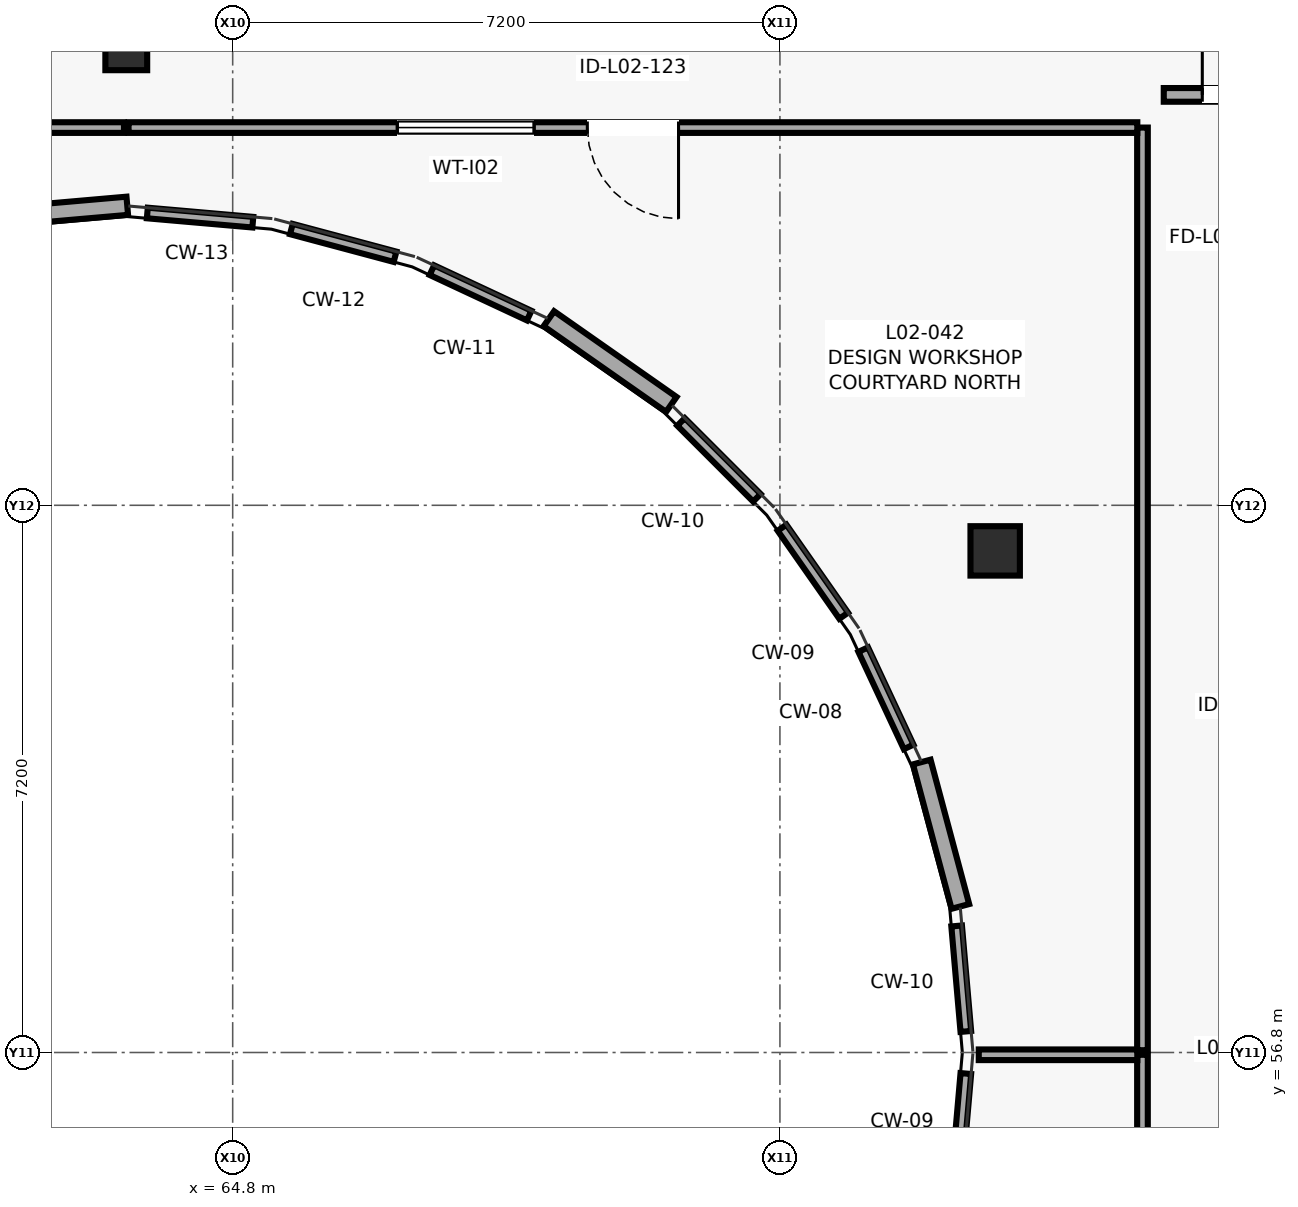
"""IFC4 building model, lengths in metres.
Left out: names, types, materials, properties, quantities, classifications, styles, units other than length and angle.
Written with IfcOpenShell. Run it as: python <this file> out.ifc"""

import sys

from ifc_helpers import new_model, si_unit, direction, frame, frame_2d, origin, origin_2d, place, context, subcontext, project, spatial, rectangle, circle, extrude, element, fill, save


model = new_model("IFC4")
c1 = context("Model", 3, precision=1e-05, world=origin(), true_north=direction((0.0, 1.0)))
c2 = subcontext(c1, "Body", "Model", "MODEL_VIEW")
j1 = project(units=[si_unit("LENGTHUNIT", "METRE"), si_unit("PLANEANGLEUNIT", "RADIAN")], contexts=[c1])
p1 = place(None, origin())
s1 = spatial("IfcSite", under=j1, at=p1, CompositionType="ELEMENT")
p2 = place(p1, origin())
s2 = spatial("IfcBuilding", under=s1, at=p2, CompositionType="ELEMENT")
p3 = place(p2, frame((0.0, 0.0, 8.2)))
s3 = spatial("IfcBuildingStorey", under=s2, at=p3, CompositionType="ELEMENT", Elevation=8.2)
p4 = place(p3, frame((63.4, 70.0, 0.0), z_axis=(0.0, 0.0, 1.0), x_axis=(1.0, 0.0, 0.0)))
e1 = element("IfcColumn", 1, at=p4, inside=s3, PredefinedType="COLUMN", context=c2, shape_type="SweptSolid", body=[
    extrude(circle(Radius=0.275, at=origin_2d()), origin(), (0.0, 0.0, 1.0), 4.0),
])
p5 = place(p3, frame((74.832, 63.4, 0.0), z_axis=(0.0, 0.0, 1.0), x_axis=(1.0, 0.0, 0.0)))
e2 = element("IfcColumn", 2, at=p5, inside=s3, PredefinedType="COLUMN", context=c2, shape_type="SweptSolid", body=[
    extrude(circle(Radius=0.325, at=origin_2d()), origin(), (0.0, 0.0, 1.0), 4.0),
])
p6 = place(p3, frame((70.571, 65.327, 0.0), z_axis=(0.0, 0.0, 1.0), x_axis=(-0.819132771028, 0.573603960436, 0.0)))
e3 = element("IfcWall", 3, at=p6, inside=s3, PredefinedType="SOLIDWALL", context=c2, shape_type="SweptSolid", body=[
    extrude(rectangle(XDim=1.967, YDim=0.24, at=frame_2d((0.983, 0.0))), origin(), (0.0, 0.0, 1.0), 3.78),
])
p7 = place(p3, frame((63.413, 67.941, 0.0), z_axis=(0.0, 0.0, 1.0), x_axis=(-0.996221008334, -0.0868544907, 0.0)))
e4 = element("IfcWall", 4, at=p7, inside=s3, PredefinedType="SOLIDWALL", context=c2, shape_type="SweptSolid", body=[
    extrude(rectangle(XDim=1.968, YDim=0.24, at=frame_2d((0.984, 0.0))), origin(), (0.0, 0.0, 1.0), 3.78),
])
p8 = place(p3, frame((74.374, 58.722, 0.0), z_axis=(0.0, 0.0, 1.0), x_axis=(-0.258303819724, 0.966063733258, 0.0)))
e5 = element("IfcWall", 5, at=p8, inside=s3, PredefinedType="SOLIDWALL", context=c2, shape_type="SweptSolid", body=[
    extrude(rectangle(XDim=1.967, YDim=0.24, at=frame_2d((0.983, 0.0))), origin(), (0.0, 0.0, 1.0), 3.78),
])
p9 = place(p3, frame((77.05, 69.4, 0.0), z_axis=(0.0, 0.0, 1.0), x_axis=(1.0, 0.0, 0.0)))
e6 = element("IfcWall", 6, at=p9, inside=s3, PredefinedType="PARTITIONING", context=c2, shape_type="SweptSolid", body=[
    extrude(rectangle(XDim=2.5, YDim=0.18, at=frame_2d((1.25, 0.0))), origin(), (0.0, 0.0, 1.0), 3.78),
])
p10 = place(p9, frame((0.507, 0.0, 0.0)))
e7 = element("IfcOpeningElement", 7, at=p10, cuts=e6, PredefinedType="OPENING", context=c2, shape_type="SweptSolid", body=[
    extrude(rectangle(XDim=1.05, YDim=2.15, at=frame_2d((0.525, 1.075))), frame((0.0, 0.1, 0.0), z_axis=(0.0, -1.0, 0.0), x_axis=(1.0, 0.0, 0.0)), (0.0, 0.0, 1.0), 0.2),
])
p11 = place(p3, frame((63.37, 68.97, 0.0), z_axis=(0.0, 0.0, 1.0), x_axis=(-1.0, 0.0, 0.0)))
e8 = element("IfcWall", 8, at=p11, inside=s3, PredefinedType="PARTITIONING", context=c2, shape_type="SweptSolid", body=[
    extrude(rectangle(XDim=17.54, YDim=0.14, at=frame_2d((8.77, 0.0))), origin(), (0.0, 0.0, 1.0), 3.775),
])
p12 = place(p11, frame((8.245, 0.0, 0.0)))
e9 = element("IfcOpeningElement", 9, at=p12, cuts=e8, PredefinedType="OPENING", context=c2, shape_type="SweptSolid", body=[
    extrude(rectangle(XDim=1.05, YDim=2.1, at=frame_2d((0.525, 1.05))), frame((0.0, 0.08, 0.0), z_axis=(0.0, -1.0, 0.0), x_axis=(1.0, 0.0, 0.0)), (0.0, 0.0, 1.0), 0.16),
])
p13 = place(p11, frame((9.995, 0.0, 1.05)))
e10 = element("IfcOpeningElement", 10, at=p13, cuts=e8, PredefinedType="OPENING", context=c2, shape_type="SweptSolid", body=[
    extrude(rectangle(XDim=1.4, YDim=1.05, at=frame_2d((0.7, 0.525))), frame((0.0, 0.08, 0.0), z_axis=(0.0, -1.0, 0.0), x_axis=(1.0, 0.0, 0.0)), (0.0, 0.0, 1.0), 0.16),
])
p14 = place(p3, frame((76.77, 44.698, 0.0), z_axis=(0.0, 0.0, 1.0), x_axis=(0.0, 1.0, 0.0)))
e11 = element("IfcWall", 11, at=p14, inside=s3, PredefinedType="PARTITIONING", context=c2, shape_type="SweptSolid", body=[
    extrude(rectangle(XDim=12.072, YDim=0.14, at=frame_2d((6.036, 0.0))), origin(), (0.0, 0.0, 1.0), 3.775),
])
p15 = place(p14, frame((5.546, 0.0, 0.0)))
e12 = element("IfcOpeningElement", 12, at=p15, cuts=e11, PredefinedType="OPENING", context=c2, shape_type="SweptSolid", body=[
    extrude(rectangle(XDim=0.98, YDim=2.12, at=frame_2d((0.49, 1.06))), frame((0.0, 0.08, 0.0), z_axis=(0.0, -1.0, 0.0), x_axis=(1.0, 0.0, 0.0)), (0.0, 0.0, 1.0), 0.16),
])
p16 = place(p14, frame((7.226, 0.0, 1.05)))
e13 = element("IfcOpeningElement", 13, at=p16, cuts=e11, PredefinedType="OPENING", context=c2, shape_type="SweptSolid", body=[
    extrude(rectangle(XDim=1.6, YDim=1.1, at=frame_2d((0.8, 0.55))), frame((0.0, 0.08, 0.0), z_axis=(0.0, -1.0, 0.0), x_axis=(1.0, 0.0, 0.0)), (0.0, 0.0, 1.0), 0.16),
])
p17 = place(p3, frame((76.702, 56.77, 0.0), z_axis=(0.0, 0.0, 1.0), x_axis=(-1.0, 0.0, 0.0)))
e14 = element("IfcWall", 14, at=p17, inside=s3, PredefinedType="PARTITIONING", context=c2, shape_type="SweptSolid", body=[
    extrude(rectangle(XDim=2.086, YDim=0.14, at=frame_2d((1.043, 0.0))), origin(), (0.0, 0.0, 1.0), 3.775),
])
p18 = place(p3, frame((74.446, 56.523, 0.0), z_axis=(0.0, 0.0, 1.0), x_axis=(-0.086916960031, -0.996215560037, 0.0)))
e15 = element("IfcWall", 15, at=p18, inside=s3, PredefinedType="PARTITIONING", context=c2, shape_type="SweptSolid", body=[
    extrude(rectangle(XDim=1.393, YDim=0.14, at=frame_2d((0.697, 0.0))), origin(), (0.0, 0.0, 1.0), 3.775),
])
p19 = place(p3, frame((70.699, 65.097, 0.0), z_axis=(0.0, 0.0, 1.0), x_axis=(0.707193272138, -0.707020279655, 0.0)))
e16 = element("IfcWall", 16, at=p19, inside=s3, PredefinedType="PARTITIONING", context=c2, shape_type="SweptSolid", body=[
    extrude(rectangle(XDim=1.411, YDim=0.14, at=frame_2d((0.706, 0.0))), origin(), (0.0, 0.0, 1.0), 3.775),
])
p20 = place(p3, frame((72.028, 63.705, 0.0), z_axis=(0.0, 0.0, 1.0), x_axis=(0.57368253481, -0.819077743108, 0.0)))
e17 = element("IfcWall", 17, at=p20, inside=s3, PredefinedType="PARTITIONING", context=c2, shape_type="SweptSolid", body=[
    extrude(rectangle(XDim=1.414, YDim=0.14, at=frame_2d((0.707, 0.0))), origin(), (0.0, 0.0, 1.0), 3.775),
])
p21 = place(p3, frame((73.096, 62.101, 0.0), z_axis=(0.0, 0.0, 1.0), x_axis=(0.423348930736, -0.905966711775, 0.0)))
e18 = element("IfcWall", 18, at=p21, inside=s3, PredefinedType="PARTITIONING", context=c2, shape_type="SweptSolid", body=[
    extrude(rectangle(XDim=1.413, YDim=0.14, at=frame_2d((0.707, 0.0))), origin(), (0.0, 0.0, 1.0), 3.775),
])
p22 = place(p3, frame((74.325, 58.465, 0.0), z_axis=(0.0, 0.0, 1.0), x_axis=(0.086901789347, -0.996216883519, 0.0)))
e19 = element("IfcWall", 19, at=p22, inside=s3, PredefinedType="PARTITIONING", context=c2, shape_type="SweptSolid", body=[
    extrude(rectangle(XDim=1.394, YDim=0.14, at=frame_2d((0.697, 0.0))), origin(), (0.0, 0.0, 1.0), 3.775),
])
p23 = place(p3, frame((76.77, 56.83, 0.0), z_axis=(0.0, 0.0, 1.0), x_axis=(0.0, 1.0, 0.0)))
e20 = element("IfcWall", 20, at=p23, inside=s3, PredefinedType="PARTITIONING", context=c2, shape_type="SweptSolid", body=[
    extrude(rectangle(XDim=12.14, YDim=0.14, at=frame_2d((6.07, 0.0))), origin(), (0.0, 0.0, 1.0), 3.775),
])
p24 = place(p3, frame((76.702, 68.97, 0.0), z_axis=(0.0, 0.0, 1.0), x_axis=(-1.0, 0.0, 0.0)))
e21 = element("IfcWall", 21, at=p24, inside=s3, PredefinedType="PARTITIONING", context=c2, shape_type="SweptSolid", body=[
    extrude(rectangle(XDim=13.272, YDim=0.14, at=frame_2d((6.636, 0.0))), origin(), (0.0, 0.0, 1.0), 3.775),
])
p25 = place(p24, frame((6.036, 0.0, 0.0)))
e22 = element("IfcOpeningElement", 22, at=p25, cuts=e21, PredefinedType="OPENING", context=c2, shape_type="SweptSolid", body=[
    extrude(rectangle(XDim=1.2, YDim=2.15, at=frame_2d((0.6, 1.075))), frame((0.0, 0.08, 0.0), z_axis=(0.0, -1.0, 0.0), x_axis=(1.0, 0.0, 0.0)), (0.0, 0.0, 1.0), 0.16),
])
p26 = place(p24, frame((7.936, 0.0, 1.05)))
e23 = element("IfcOpeningElement", 23, at=p26, cuts=e21, PredefinedType="OPENING", context=c2, shape_type="SweptSolid", body=[
    extrude(rectangle(XDim=1.8, YDim=1.2, at=frame_2d((0.9, 0.6))), frame((0.0, 0.08, 0.0), z_axis=(0.0, -1.0, 0.0), x_axis=(1.0, 0.0, 0.0)), (0.0, 0.0, 1.0), 0.16),
])
p27 = place(p3, frame((63.677, 67.846, 0.0), z_axis=(0.0, 0.0, 1.0), x_axis=(0.99623071841, -0.086743044083, 0.0)))
e24 = element("IfcWall", 24, at=p27, inside=s3, PredefinedType="PARTITIONING", context=c2, shape_type="SweptSolid", body=[
    extrude(rectangle(XDim=1.393, YDim=0.14, at=frame_2d((0.697, 0.0))), origin(), (0.0, 0.0, 1.0), 3.775),
])
p28 = place(p3, frame((65.572, 67.635, 0.0), z_axis=(0.0, 0.0, 1.0), x_axis=(0.966013611766, -0.258491202719, 0.0)))
e25 = element("IfcWall", 25, at=p28, inside=s3, PredefinedType="PARTITIONING", context=c2, shape_type="SweptSolid", body=[
    extrude(rectangle(XDim=1.412, YDim=0.14, at=frame_2d((0.706, 0.0))), origin(), (0.0, 0.0, 1.0), 3.775),
])
p29 = place(p3, frame((67.421, 67.094, 0.0), z_axis=(0.0, 0.0, 1.0), x_axis=(0.906032979506, -0.423207088844, 0.0)))
e26 = element("IfcWall", 26, at=p29, inside=s3, PredefinedType="PARTITIONING", context=c2, shape_type="SweptSolid", body=[
    extrude(rectangle(XDim=1.413, YDim=0.14, at=frame_2d((0.707, 0.0))), origin(), (0.0, 0.0, 1.0), 3.775),
])
p30 = place(p10, origin())
e27 = element("IfcDoor", 27, at=p30, inside=s3, OperationType="SINGLE_SWING_LEFT", PredefinedType="DOOR", context=c2, shape_type="SweptSolid", body=[
    extrude(rectangle(XDim=1.05, YDim=2.15, at=frame_2d((0.525, 1.075))), frame((0.0, 0.025, 0.0), z_axis=(0.0, -1.0, 0.0), x_axis=(1.0, 0.0, 0.0)), (0.0, 0.0, 1.0), 0.05),
])
fill(e7, e27)
p31 = place(p25, origin())
e28 = element("IfcDoor", 28, at=p31, inside=s3, OperationType="SINGLE_SWING_LEFT", PredefinedType="DOOR", context=c2, shape_type="SweptSolid", body=[
    extrude(rectangle(XDim=1.2, YDim=2.15, at=frame_2d((0.6, 1.075))), frame((0.0, 0.025, 0.0), z_axis=(0.0, -1.0, 0.0), x_axis=(1.0, 0.0, 0.0)), (0.0, 0.0, 1.0), 0.05),
])
fill(e22, e28)
p32 = place(p26, origin())
e29 = element("IfcWindow", 29, at=p32, inside=s3, PartitioningType="SINGLE_PANEL", PredefinedType="WINDOW", context=c2, shape_type="SweptSolid", body=[
    extrude(rectangle(XDim=1.8, YDim=1.2, at=frame_2d((0.9, 0.6))), frame((0.0, 0.03, 0.0), z_axis=(0.0, -1.0, 0.0), x_axis=(1.0, 0.0, 0.0)), (0.0, 0.0, 1.0), 0.06),
])
fill(e23, e29)
save(model, sys.argv[1])
